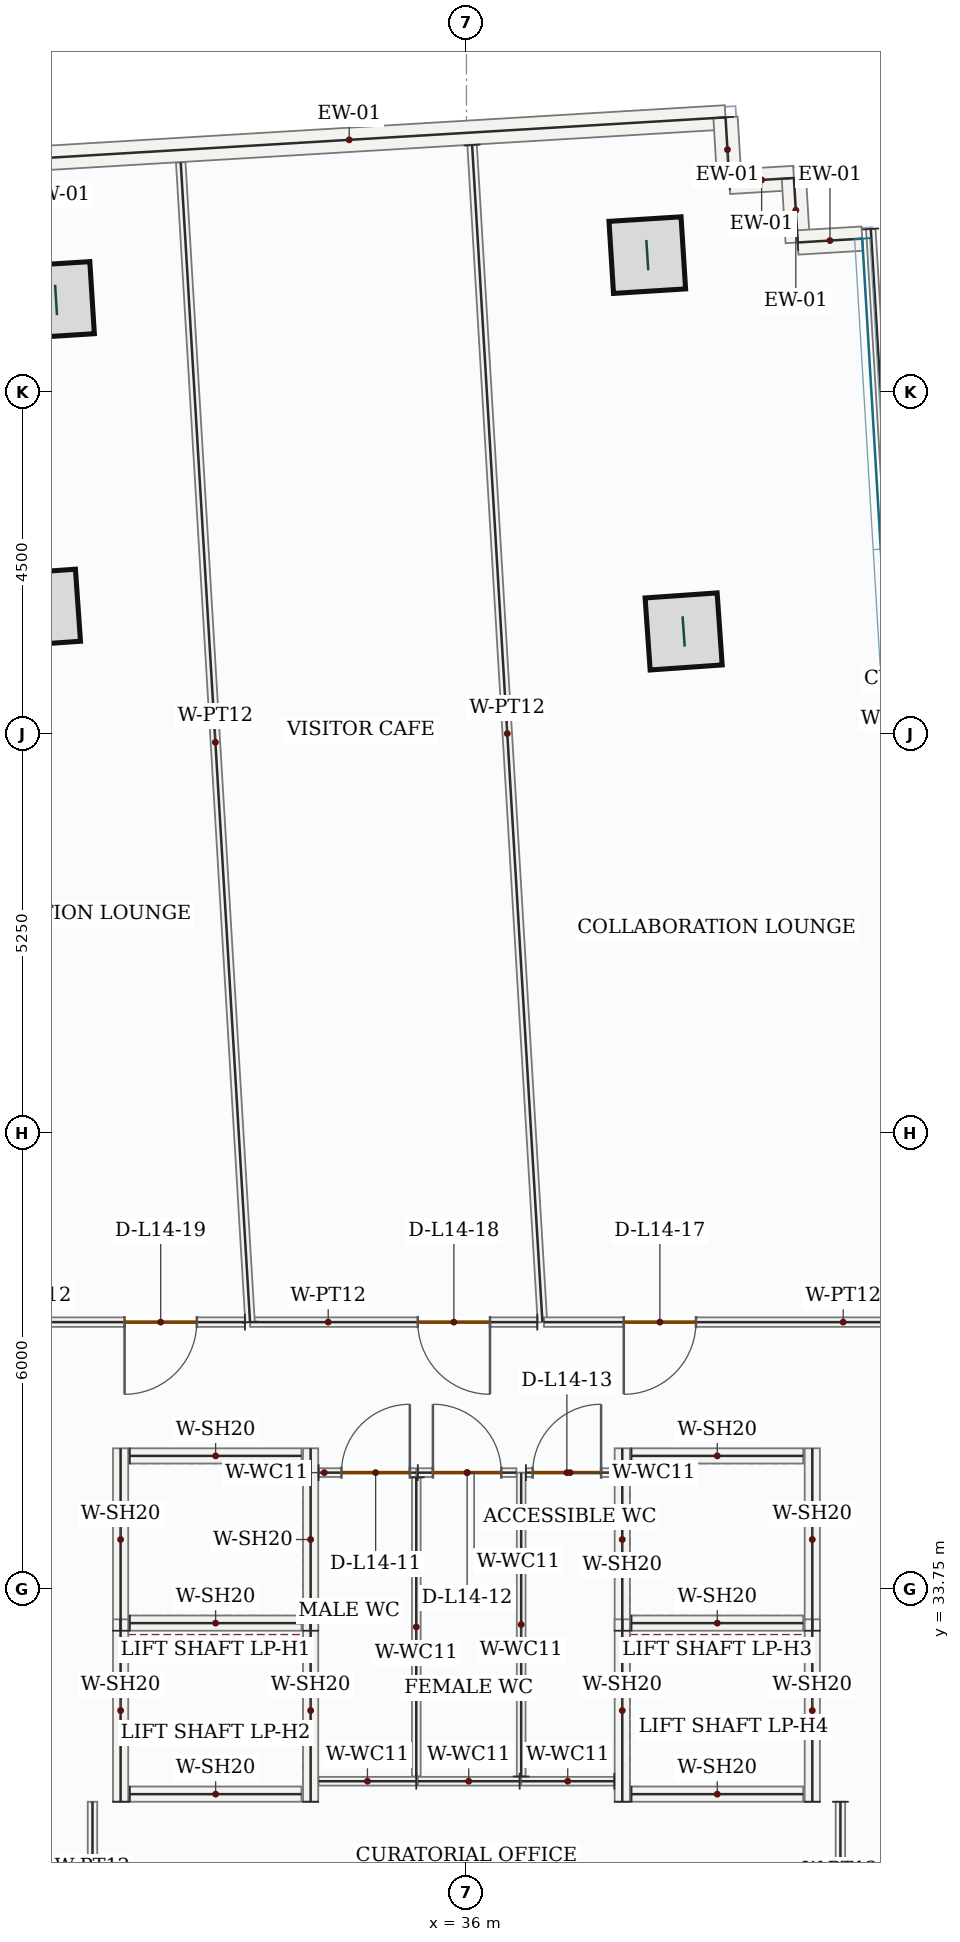
"""IFC4 building model, lengths in metres.
Left out: names, types, materials, properties, quantities, classifications, styles, units other than length and angle.
Written with IfcOpenShell. Run it as: python <this file> out.ifc"""

import sys

from ifc_helpers import new_model, si_unit, direction, frame, frame_2d, origin, origin_2d, place, context, subcontext, project, spatial, rectangle, hollow_rectangle, extrude, source, transform, mapped, element, fill, save


model = new_model("IFC4")
c1 = context("Model", 3, precision=1e-05, world=origin(), true_north=direction((0.0, 1.0)))
c2 = subcontext(c1, "Body", "Model", "MODEL_VIEW")
j1 = project(units=[si_unit("LENGTHUNIT", "METRE"), si_unit("PLANEANGLEUNIT", "RADIAN")], contexts=[c1])
p1 = place(None, origin())
s1 = spatial("IfcSite", under=j1, at=p1, CompositionType="ELEMENT")
p2 = place(p1, origin())
s2 = spatial("IfcBuilding", under=s1, at=p2, CompositionType="ELEMENT")
p3 = place(p2, frame((0.0, 0.0, 66.9)))
s3 = spatial("IfcBuildingStorey", under=s2, at=p3, CompositionType="ELEMENT", Elevation=66.9)
m1 = source(origin(), c2, "Body", "SweptSolid", [
    extrude(hollow_rectangle(XDim=0.95, YDim=0.95, WallThickness=0.05, at=origin_2d()), origin(), (0.0, 0.0, 1.0), 4.2),
])
for number, where, z_axis, x_axis in (
    (1, (38.857, 46.346, 0.0), (0.0, 0.0, 1.0), (-0.07, 0.998, 0.0)),
    (2, (30.415, 46.658, 0.0), (0.0, 0.0, 1.0), (-0.07, 0.998, 0.0)),
    (3, (38.379, 51.297, 0.0), (0.0, 0.0, 1.0), (-0.063, 0.998, 0.0)),
    (4, (30.601, 50.708, 0.0), (0.0, 0.0, 1.0), (-0.063, 0.998, 0.0)),
):
    element("IfcColumn", number, at=place(p3, frame(where, z_axis=z_axis, x_axis=x_axis)), inside=s3, PredefinedType="COLUMN", context=c2, shape_type="MappedRepresentation", body=[
        mapped(m1, transform((0.0, 0.0, 0.0), x_axis=(1.0, 0.0, 0.0), y_axis=(0.0, 1.0, 0.0), z_axis=(0.0, 0.0, 1.0), scale=1.0)),
    ])
m2 = source(origin(), c2, "Body", "SweptSolid", [
    extrude(rectangle(XDim=9.92, YDim=0.32, at=frame_2d((4.96, 0.0))), origin(), (0.0, 0.0, 1.0), 3.95),
])
p4 = place(p3, frame((29.506, 52.518, 0.0), z_axis=(0.0, 0.0, 1.0), x_axis=(0.998218942745, 0.059656871726, 0.0)))
e5 = element("IfcWall", 5, at=p4, inside=s3, PredefinedType="SOLIDWALL", context=c2, shape_type="MappedRepresentation", body=[
    mapped(m2, transform((0.0, 0.0, 0.0), x_axis=(1.0, 0.0, 0.0), y_axis=(0.0, 1.0, 0.0), z_axis=(0.0, 0.0, 1.0), scale=1.0)),
])
m3 = source(origin(), c2, "Body", "SweptSolid", [
    extrude(rectangle(XDim=0.85, YDim=0.32, at=frame_2d((0.425, 0.0))), origin(), (0.0, 0.0, 1.0), 3.95),
])
p5 = place(p3, frame((39.408, 53.11, 0.0), z_axis=(0.0, 0.0, 1.0), x_axis=(0.059732049764, -0.998214447016, 0.0)))
e6 = element("IfcWall", 6, at=p5, inside=s3, PredefinedType="SOLIDWALL", context=c2, shape_type="MappedRepresentation", body=[
    mapped(m3, transform((0.0, 0.0, 0.0), x_axis=(1.0, 0.0, 0.0), y_axis=(0.0, 1.0, 0.0), z_axis=(0.0, 0.0, 1.0), scale=1.0)),
])
m4 = source(origin(), c2, "Body", "SweptSolid", [
    extrude(rectangle(XDim=0.85, YDim=0.32, at=frame_2d((0.425, 0.0))), origin(), (0.0, 0.0, 1.0), 3.95),
])
for number, where, z_axis, x_axis in (
    (7, (39.459, 52.261, 0.0), (0.0, 0.0, 1.0), (0.998, 0.06, 0.0)),
    (8, (40.308, 52.312, 0.0), (0.0, 0.0, 1.0), (0.06, -0.998, 0.0)),
    (9, (40.358, 51.464, 0.0), (0.0, 0.0, 1.0), (0.998, 0.06, 0.0)),
):
    element("IfcWall", number, at=place(p3, frame(where, z_axis=z_axis, x_axis=x_axis)), inside=s3, PredefinedType="SOLIDWALL", context=c2, shape_type="MappedRepresentation", body=[
        mapped(m4, transform((0.0, 0.0, 0.0), x_axis=(1.0, 0.0, 0.0), y_axis=(0.0, 1.0, 0.0), z_axis=(0.0, 0.0, 1.0), scale=1.0)),
    ])
m5 = source(origin(), c2, "Body", "SweptSolid", [
    extrude(rectangle(XDim=2.4, YDim=0.2, at=frame_2d((1.2, 0.0))), origin(), (0.0, 0.0, 1.0), 3.95),
])
for number, where, z_axis, x_axis in (
    (10, (31.45, 33.2, 0.0), (0.0, 0.0, 1.0), (0.0, 1.0, 0.0)),
    (11, (33.95, 33.2, 0.0), (0.0, 0.0, 1.0), (0.0, 1.0, 0.0)),
):
    element("IfcWall", number, at=place(p3, frame(where, z_axis=z_axis, x_axis=x_axis)), inside=s3, PredefinedType="SOLIDWALL", context=c2, shape_type="MappedRepresentation", body=[
        mapped(m5, transform((0.0, 0.0, 0.0), x_axis=(1.0, 0.0, 0.0), y_axis=(0.0, 1.0, 0.0), z_axis=(0.0, 0.0, 1.0), scale=1.0)),
    ])
m6 = source(origin(), c2, "Body", "SweptSolid", [
    extrude(rectangle(XDim=2.26, YDim=0.2, at=frame_2d((1.13, 0.0))), origin(), (0.0, 0.0, 1.0), 3.95),
])
for number, where, z_axis, x_axis in (
    (12, (31.57, 33.3, 0.0), (0.0, 0.0, 1.0), (1.0, 0.0, 0.0)),
    (13, (31.57, 35.5, 0.0), (0.0, 0.0, 1.0), (1.0, 0.0, 0.0)),
):
    element("IfcWall", number, at=place(p3, frame(where, z_axis=z_axis, x_axis=x_axis)), inside=s3, PredefinedType="SOLIDWALL", context=c2, shape_type="MappedRepresentation", body=[
        mapped(m6, transform((0.0, 0.0, 0.0), x_axis=(1.0, 0.0, 0.0), y_axis=(0.0, 1.0, 0.0), z_axis=(0.0, 0.0, 1.0), scale=1.0)),
    ])
for number, where, z_axis, x_axis in (
    (14, (31.45, 30.95, 0.0), (0.0, 0.0, 1.0), (0.0, 1.0, 0.0)),
    (15, (33.95, 30.95, 0.0), (0.0, 0.0, 1.0), (0.0, 1.0, 0.0)),
):
    element("IfcWall", number, at=place(p3, frame(where, z_axis=z_axis, x_axis=x_axis)), inside=s3, PredefinedType="SOLIDWALL", context=c2, shape_type="MappedRepresentation", body=[
        mapped(m5, transform((0.0, 0.0, 0.0), x_axis=(1.0, 0.0, 0.0), y_axis=(0.0, 1.0, 0.0), z_axis=(0.0, 0.0, 1.0), scale=1.0)),
    ])
p6 = place(p3, frame((31.57, 31.05, 0.0), z_axis=(0.0, 0.0, 1.0), x_axis=(1.0, 0.0, 0.0)))
e16 = element("IfcWall", 16, at=p6, inside=s3, PredefinedType="SOLIDWALL", context=c2, shape_type="MappedRepresentation", body=[
    mapped(m6, transform((0.0, 0.0, 0.0), x_axis=(1.0, 0.0, 0.0), y_axis=(0.0, 1.0, 0.0), z_axis=(0.0, 0.0, 1.0), scale=1.0)),
])
for number, where, z_axis, x_axis in (
    (17, (38.05, 33.2, 0.0), (0.0, 0.0, 1.0), (0.0, 1.0, 0.0)),
    (18, (40.55, 33.2, 0.0), (0.0, 0.0, 1.0), (0.0, 1.0, 0.0)),
):
    element("IfcWall", number, at=place(p3, frame(where, z_axis=z_axis, x_axis=x_axis)), inside=s3, PredefinedType="SOLIDWALL", context=c2, shape_type="MappedRepresentation", body=[
        mapped(m5, transform((0.0, 0.0, 0.0), x_axis=(1.0, 0.0, 0.0), y_axis=(0.0, 1.0, 0.0), z_axis=(0.0, 0.0, 1.0), scale=1.0)),
    ])
for number, where, z_axis, x_axis in (
    (19, (38.17, 33.3, 0.0), (0.0, 0.0, 1.0), (1.0, 0.0, 0.0)),
    (20, (38.17, 35.5, 0.0), (0.0, 0.0, 1.0), (1.0, 0.0, 0.0)),
):
    element("IfcWall", number, at=place(p3, frame(where, z_axis=z_axis, x_axis=x_axis)), inside=s3, PredefinedType="SOLIDWALL", context=c2, shape_type="MappedRepresentation", body=[
        mapped(m6, transform((0.0, 0.0, 0.0), x_axis=(1.0, 0.0, 0.0), y_axis=(0.0, 1.0, 0.0), z_axis=(0.0, 0.0, 1.0), scale=1.0)),
    ])
for number, where, z_axis, x_axis in (
    (21, (38.05, 30.95, 0.0), (0.0, 0.0, 1.0), (0.0, 1.0, 0.0)),
    (22, (40.55, 30.95, 0.0), (0.0, 0.0, 1.0), (0.0, 1.0, 0.0)),
):
    element("IfcWall", number, at=place(p3, frame(where, z_axis=z_axis, x_axis=x_axis)), inside=s3, PredefinedType="SOLIDWALL", context=c2, shape_type="MappedRepresentation", body=[
        mapped(m5, transform((0.0, 0.0, 0.0), x_axis=(1.0, 0.0, 0.0), y_axis=(0.0, 1.0, 0.0), z_axis=(0.0, 0.0, 1.0), scale=1.0)),
    ])
p7 = place(p3, frame((38.17, 31.05, 0.0), z_axis=(0.0, 0.0, 1.0), x_axis=(1.0, 0.0, 0.0)))
e23 = element("IfcWall", 23, at=p7, inside=s3, PredefinedType="SOLIDWALL", context=c2, shape_type="MappedRepresentation", body=[
    mapped(m6, transform((0.0, 0.0, 0.0), x_axis=(1.0, 0.0, 0.0), y_axis=(0.0, 1.0, 0.0), z_axis=(0.0, 0.0, 1.0), scale=1.0)),
])
m7 = source(origin(), c2, "Body", "SweptSolid", [
    extrude(rectangle(XDim=1.225, YDim=0.115, at=frame_2d((0.613, 0.0))), origin(), (0.0, 0.0, 1.0), 3.95),
])
p8 = place(p3, frame((37.945, 31.22, 0.0), z_axis=(0.0, 0.0, 1.0), x_axis=(-1.0, 0.0, 0.0)))
e24 = element("IfcWall", 24, at=p8, inside=s3, PredefinedType="PARTITIONING", context=c2, shape_type="MappedRepresentation", body=[
    mapped(m7, transform((0.0, 0.0, 0.0), x_axis=(1.0, 0.0, 0.0), y_axis=(0.0, 1.0, 0.0), z_axis=(0.0, 0.0, 1.0), scale=1.0)),
])
m8 = source(origin(), c2, "Body", "SweptSolid", [
    extrude(rectangle(XDim=3.998, YDim=0.115, at=frame_2d((1.999, 0.0))), origin(), (0.0, 0.0, 1.0), 3.95),
])
p9 = place(p3, frame((36.72, 31.282, 0.0), z_axis=(0.0, 0.0, 1.0), x_axis=(0.0, 1.0, 0.0)))
e25 = element("IfcWall", 25, at=p9, inside=s3, PredefinedType="PARTITIONING", context=c2, shape_type="MappedRepresentation", body=[
    mapped(m8, transform((0.0, 0.0, 0.0), x_axis=(1.0, 0.0, 0.0), y_axis=(0.0, 1.0, 0.0), z_axis=(0.0, 0.0, 1.0), scale=1.0)),
])
p10 = place(p3, frame((36.782, 35.28, 0.0), z_axis=(0.0, 0.0, 1.0), x_axis=(1.0, 0.0, 0.0)))
e26 = element("IfcWall", 26, at=p10, inside=s3, PredefinedType="PARTITIONING", context=c2, shape_type="SweptSolid", body=[
    extrude(rectangle(XDim=1.163, YDim=0.115, at=frame_2d((0.581, 0.0))), origin(), (0.0, 0.0, 1.0), 3.95),
])
p11 = place(p10, frame((0.089, 0.0, 0.0)))
e27 = element("IfcOpeningElement", 27, at=p11, cuts=e26, PredefinedType="OPENING", context=c2, shape_type="SweptSolid", body=[
    extrude(rectangle(XDim=0.9, YDim=2.1, at=frame_2d((0.45, 1.05))), frame((0.0, 0.067, 0.0), z_axis=(0.0, -1.0, 0.0), x_axis=(1.0, 0.0, 0.0)), (0.0, 0.0, 1.0), 0.135),
])
m9 = source(origin(), c2, "Body", "SweptSolid", [
    extrude(rectangle(XDim=1.285, YDim=0.115, at=frame_2d((0.643, 0.0))), origin(), (0.0, 0.0, 1.0), 3.95),
])
p12 = place(p3, frame((35.34, 31.22, 0.0), z_axis=(0.0, 0.0, 1.0), x_axis=(-1.0, 0.0, 0.0)))
e28 = element("IfcWall", 28, at=p12, inside=s3, PredefinedType="PARTITIONING", context=c2, shape_type="MappedRepresentation", body=[
    mapped(m9, transform((0.0, 0.0, 0.0), x_axis=(1.0, 0.0, 0.0), y_axis=(0.0, 1.0, 0.0), z_axis=(0.0, 0.0, 1.0), scale=1.0)),
])
p13 = place(p3, frame((34.055, 35.28, 0.0), z_axis=(0.0, 0.0, 1.0), x_axis=(1.0, 0.0, 0.0)))
e29 = element("IfcWall", 29, at=p13, inside=s3, PredefinedType="PARTITIONING", context=c2, shape_type="SweptSolid", body=[
    extrude(rectangle(XDim=1.285, YDim=0.115, at=frame_2d((0.643, 0.0))), origin(), (0.0, 0.0, 1.0), 3.95),
])
p14 = place(p13, frame((0.3, 0.0, 0.0)))
e30 = element("IfcOpeningElement", 30, at=p14, cuts=e29, PredefinedType="OPENING", context=c2, shape_type="SweptSolid", body=[
    extrude(rectangle(XDim=0.9, YDim=2.1, at=frame_2d((0.45, 1.05))), frame((0.0, 0.067, 0.0), z_axis=(0.0, -1.0, 0.0), x_axis=(1.0, 0.0, 0.0)), (0.0, 0.0, 1.0), 0.135),
])
m10 = source(origin(), c2, "Body", "SweptSolid", [
    extrude(rectangle(XDim=3.935, YDim=0.115, at=frame_2d((1.968, 0.0))), origin(), (0.0, 0.0, 1.0), 3.95),
])
p15 = place(p3, frame((35.34, 35.218, 0.0), z_axis=(0.0, 0.0, 1.0), x_axis=(0.0, -1.0, 0.0)))
e31 = element("IfcWall", 31, at=p15, inside=s3, PredefinedType="PARTITIONING", context=c2, shape_type="MappedRepresentation", body=[
    mapped(m10, transform((0.0, 0.0, 0.0), x_axis=(1.0, 0.0, 0.0), y_axis=(0.0, 1.0, 0.0), z_axis=(0.0, 0.0, 1.0), scale=1.0)),
])
m11 = source(origin(), c2, "Body", "SweptSolid", [
    extrude(rectangle(XDim=1.34, YDim=0.115, at=frame_2d((0.67, 0.0))), origin(), (0.0, 0.0, 1.0), 3.95),
])
p16 = place(p3, frame((36.7, 31.22, 0.0), z_axis=(0.0, 0.0, 1.0), x_axis=(-1.0, 0.0, 0.0)))
e32 = element("IfcWall", 32, at=p16, inside=s3, PredefinedType="PARTITIONING", context=c2, shape_type="MappedRepresentation", body=[
    mapped(m11, transform((0.0, 0.0, 0.0), x_axis=(1.0, 0.0, 0.0), y_axis=(0.0, 1.0, 0.0), z_axis=(0.0, 0.0, 1.0), scale=1.0)),
])
p17 = place(p3, frame((35.36, 35.28, 0.0), z_axis=(0.0, 0.0, 1.0), x_axis=(1.0, 0.0, 0.0)))
e33 = element("IfcWall", 33, at=p17, inside=s3, PredefinedType="PARTITIONING", context=c2, shape_type="SweptSolid", body=[
    extrude(rectangle(XDim=1.297, YDim=0.115, at=frame_2d((0.649, 0.0))), origin(), (0.0, 0.0, 1.0), 3.95),
])
p18 = place(p17, frame((0.199, 0.0, 0.0)))
e34 = element("IfcOpeningElement", 34, at=p18, cuts=e33, PredefinedType="OPENING", context=c2, shape_type="SweptSolid", body=[
    extrude(rectangle(XDim=0.9, YDim=2.1, at=frame_2d((0.45, 1.05))), frame((0.0, 0.067, 0.0), z_axis=(0.0, -1.0, 0.0), x_axis=(1.0, 0.0, 0.0)), (0.0, 0.0, 1.0), 0.135),
])
m12 = source(origin(), c2, "Body", "SweptSolid", [
    extrude(rectangle(XDim=2.47, YDim=0.125, at=frame_2d((1.235, 0.0))), origin(), (0.0, 0.0, 1.0), 3.95),
])
p19 = place(p3, frame((40.92, 30.95, 0.0), z_axis=(0.0, 0.0, 1.0), x_axis=(0.0, -1.0, 0.0)))
e35 = element("IfcWall", 35, at=p19, inside=s3, PredefinedType="PARTITIONING", context=c2, shape_type="MappedRepresentation", body=[
    mapped(m12, transform((0.0, 0.0, 0.0), x_axis=(1.0, 0.0, 0.0), y_axis=(0.0, 1.0, 0.0), z_axis=(0.0, 0.0, 1.0), scale=1.0)),
])
m13 = source(origin(), c2, "Body", "SweptSolid", [
    extrude(rectangle(XDim=2.402, YDim=0.125, at=frame_2d((1.201, 0.0))), origin(), (0.0, 0.0, 1.0), 3.95),
])
p20 = place(p3, frame((31.08, 28.548, 0.0), z_axis=(0.0, 0.0, 1.0), x_axis=(0.0, 1.0, 0.0)))
e36 = element("IfcWall", 36, at=p20, inside=s3, PredefinedType="PARTITIONING", context=c2, shape_type="MappedRepresentation", body=[
    mapped(m13, transform((0.0, 0.0, 0.0), x_axis=(1.0, 0.0, 0.0), y_axis=(0.0, 1.0, 0.0), z_axis=(0.0, 0.0, 1.0), scale=1.0)),
])
m14 = source(origin(), c2, "Body", "SweptSolid", [
    extrude(rectangle(XDim=15.513, YDim=0.125, at=frame_2d((7.756, 0.0))), origin(), (0.0, 0.0, 1.0), 3.95),
])
p21 = place(p3, frame((36.074, 52.745, 0.0), z_axis=(0.0, 0.0, 1.0), x_axis=(0.059662086624, -0.998218631072, 0.0)))
e37 = element("IfcWall", 37, at=p21, inside=s3, PredefinedType="PARTITIONING", context=c2, shape_type="MappedRepresentation", body=[
    mapped(m14, transform((0.0, 0.0, 0.0), x_axis=(1.0, 0.0, 0.0), y_axis=(0.0, 1.0, 0.0), z_axis=(0.0, 0.0, 1.0), scale=1.0)),
])
p22 = place(p3, frame((36.932, 37.26, 0.0), z_axis=(0.0, 0.0, 1.0), x_axis=(-1.0, 0.0, 0.0)))
e38 = element("IfcWall", 38, at=p22, inside=s3, PredefinedType="PARTITIONING", context=c2, shape_type="SweptSolid", body=[
    extrude(rectangle(XDim=3.779, YDim=0.125, at=frame_2d((1.89, 0.0))), origin(), (0.0, 0.0, 1.0), 3.95),
])
p23 = place(p22, frame((0.622, 0.0, 0.0)))
e39 = element("IfcOpeningElement", 39, at=p23, cuts=e38, PredefinedType="OPENING", context=c2, shape_type="SweptSolid", body=[
    extrude(rectangle(XDim=0.95, YDim=2.15, at=frame_2d((0.475, 1.075))), frame((0.0, 0.073, 0.0), z_axis=(0.0, -1.0, 0.0), x_axis=(1.0, 0.0, 0.0)), (0.0, 0.0, 1.0), 0.145),
])
m15 = source(origin(), c2, "Body", "SweptSolid", [
    extrude(rectangle(XDim=15.283, YDim=0.125, at=frame_2d((7.642, 0.0))), origin(), (0.0, 0.0, 1.0), 3.95),
])
p24 = place(p3, frame((33.153, 37.26, 0.0), z_axis=(0.0, 0.0, 1.0), x_axis=(-0.059648121824, 0.99821946563, 0.0)))
e40 = element("IfcWall", 40, at=p24, inside=s3, PredefinedType="PARTITIONING", context=c2, shape_type="MappedRepresentation", body=[
    mapped(m15, transform((0.0, 0.0, 0.0), x_axis=(1.0, 0.0, 0.0), y_axis=(0.0, 1.0, 0.0), z_axis=(0.0, 0.0, 1.0), scale=1.0)),
])
p25 = place(p3, frame((33.085, 37.26, 0.0), z_axis=(0.0, 0.0, 1.0), x_axis=(-0.999999997966, -6.3783646e-05, 0.0)))
e41 = element("IfcWall", 41, at=p25, inside=s3, PredefinedType="PARTITIONING", context=c2, shape_type="SweptSolid", body=[
    extrude(rectangle(XDim=3.828, YDim=0.125, at=frame_2d((1.914, 0.0))), origin(), (0.0, 0.0, 1.0), 3.95),
])
p26 = place(p25, frame((0.633, 0.0, 0.0)))
e42 = element("IfcOpeningElement", 42, at=p26, cuts=e41, PredefinedType="OPENING", context=c2, shape_type="SweptSolid", body=[
    extrude(rectangle(XDim=0.95, YDim=2.15, at=frame_2d((0.475, 1.075))), frame((0.0, 0.073, 0.0), z_axis=(0.0, -1.0, 0.0), x_axis=(1.0, 0.0, 0.0)), (0.0, 0.0, 1.0), 0.145),
])
p27 = place(p3, frame((42.742, 37.26, 0.0), z_axis=(0.0, 0.0, 1.0), x_axis=(-0.99999999909, 4.2662116e-05, 0.0)))
e43 = element("IfcWall", 43, at=p27, inside=s3, PredefinedType="PARTITIONING", context=c2, shape_type="SweptSolid", body=[
    extrude(rectangle(XDim=5.723, YDim=0.125, at=frame_2d((2.861, 0.0))), origin(), (0.0, 0.0, 1.0), 3.95),
])
p28 = place(p27, frame((3.723, 0.0, 0.0)))
e44 = element("IfcOpeningElement", 44, at=p28, cuts=e43, PredefinedType="OPENING", context=c2, shape_type="SweptSolid", body=[
    extrude(rectangle(XDim=0.95, YDim=2.15, at=frame_2d((0.475, 1.075))), frame((0.0, 0.073, 0.0), z_axis=(0.0, -1.0, 0.0), x_axis=(1.0, 0.0, 0.0)), (0.0, 0.0, 1.0), 0.145),
])
m16 = source(origin(), c2, "Body", "SweptSolid", [
    extrude(rectangle(XDim=12.238, YDim=0.125, at=frame_2d((6.119, 0.0))), origin(), (0.0, 0.0, 1.0), 3.95),
])
p29 = place(p3, frame((41.32, 51.641, 0.0), z_axis=(0.0, 0.0, 1.0), x_axis=(0.059807214901, -0.998209946377, 0.0)))
e45 = element("IfcWall", 45, at=p29, inside=s3, PredefinedType="PARTITIONING", context=c2, shape_type="MappedRepresentation", body=[
    mapped(m16, transform((0.0, 0.0, 0.0), x_axis=(1.0, 0.0, 0.0), y_axis=(0.0, 1.0, 0.0), z_axis=(0.0, 0.0, 1.0), scale=1.0)),
])
m17 = source(origin(), c2, "Body", "SweptSolid", [
    extrude(rectangle(XDim=0.9, YDim=2.1, at=frame_2d((0.45, 1.05))), frame((0.0, 0.025, 0.0), z_axis=(0.0, -1.0, 0.0), x_axis=(1.0, 0.0, 0.0)), (0.0, 0.0, 1.0), 0.05),
])
p30 = place(p14, origin())
e46 = element("IfcDoor", 46, at=p30, inside=s3, OperationType="SINGLE_SWING_RIGHT", PredefinedType="DOOR", context=c2, shape_type="MappedRepresentation", body=[
    mapped(m17, transform((0.0, 0.0, 0.0), x_axis=(1.0, 0.0, 0.0), y_axis=(0.0, 1.0, 0.0), z_axis=(0.0, 0.0, 1.0), scale=1.0)),
])
fill(e30, e46)
p31 = place(p18, origin())
e47 = element("IfcDoor", 47, at=p31, inside=s3, OperationType="SINGLE_SWING_LEFT", PredefinedType="DOOR", context=c2, shape_type="MappedRepresentation", body=[
    mapped(m17, transform((0.0, 0.0, 0.0), x_axis=(1.0, 0.0, 0.0), y_axis=(0.0, 1.0, 0.0), z_axis=(0.0, 0.0, 1.0), scale=1.0)),
])
fill(e34, e47)
p32 = place(p11, origin())
e48 = element("IfcDoor", 48, at=p32, inside=s3, OperationType="SINGLE_SWING_RIGHT", PredefinedType="DOOR", context=c2, shape_type="MappedRepresentation", body=[
    mapped(m17, transform((0.0, 0.0, 0.0), x_axis=(1.0, 0.0, 0.0), y_axis=(0.0, 1.0, 0.0), z_axis=(0.0, 0.0, 1.0), scale=1.0)),
])
fill(e27, e48)
m18 = source(origin(), c2, "Body", "SweptSolid", [
    extrude(rectangle(XDim=0.95, YDim=2.15, at=frame_2d((0.475, 1.075))), frame((0.0, 0.025, 0.0), z_axis=(0.0, -1.0, 0.0), x_axis=(1.0, 0.0, 0.0)), (0.0, 0.0, 1.0), 0.05),
])
p33 = place(p28, origin())
e49 = element("IfcDoor", 49, at=p33, inside=s3, OperationType="SINGLE_SWING_RIGHT", PredefinedType="DOOR", context=c2, shape_type="MappedRepresentation", body=[
    mapped(m18, transform((0.0, 0.0, 0.0), x_axis=(1.0, 0.0, 0.0), y_axis=(0.0, 1.0, 0.0), z_axis=(0.0, 0.0, 1.0), scale=1.0)),
])
fill(e44, e49)
p34 = place(p23, origin())
e50 = element("IfcDoor", 50, at=p34, inside=s3, OperationType="SINGLE_SWING_LEFT", PredefinedType="DOOR", context=c2, shape_type="MappedRepresentation", body=[
    mapped(m18, transform((0.0, 0.0, 0.0), x_axis=(1.0, 0.0, 0.0), y_axis=(0.0, 1.0, 0.0), z_axis=(0.0, 0.0, 1.0), scale=1.0)),
])
fill(e39, e50)
p35 = place(p26, origin())
e51 = element("IfcDoor", 51, at=p35, inside=s3, OperationType="SINGLE_SWING_RIGHT", PredefinedType="DOOR", context=c2, shape_type="MappedRepresentation", body=[
    mapped(m18, transform((0.0, 0.0, 0.0), x_axis=(1.0, 0.0, 0.0), y_axis=(0.0, 1.0, 0.0), z_axis=(0.0, 0.0, 1.0), scale=1.0)),
])
fill(e42, e51)
save(model, sys.argv[1])
